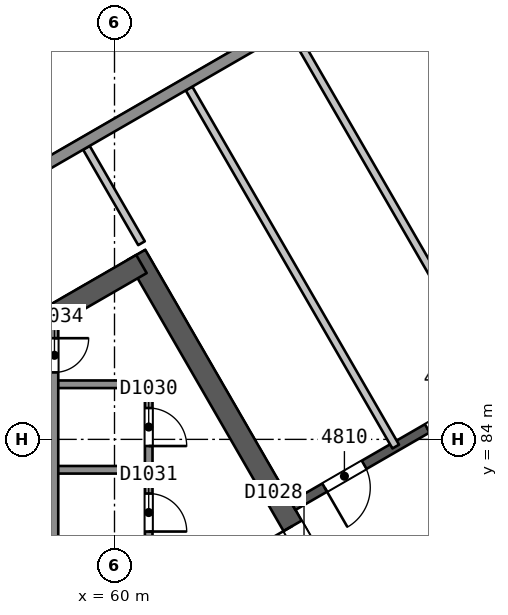
"""IFC4 building model, lengths in metres.
Left out: names, types, materials, properties, quantities, classifications, styles, units other than length and angle.
Written with IfcOpenShell. Run it as: python <this file> out.ifc"""

import sys

from ifc_helpers import new_model, si_unit, direction, frame, frame_2d, origin, place, context, subcontext, project, spatial, rectangle, extrude, element, fill, save


model = new_model("IFC4")
c1 = context("Model", 3, precision=1e-05, world=origin(), true_north=direction((0.0, 1.0)))
c2 = subcontext(c1, "Body", "Model", "MODEL_VIEW")
j1 = project(units=[si_unit("LENGTHUNIT", "METRE"), si_unit("PLANEANGLEUNIT", "RADIAN")], contexts=[c1])
p1 = place(None, origin())
s1 = spatial("IfcSite", under=j1, at=p1, CompositionType="ELEMENT")
p2 = place(p1, origin())
s2 = spatial("IfcBuilding", under=s1, at=p2, CompositionType="ELEMENT")
p3 = place(p2, frame((0.0, 0.0, 197.0)))
s3 = spatial("IfcBuildingStorey", under=s2, at=p3, CompositionType="ELEMENT", Elevation=197.0)
p4 = place(p3, frame((65.682, 80.0, 0.0), z_axis=(0.0, 0.0, 1.0), x_axis=(-0.500000202252, 0.866025287014, 0.0)))
e1 = element("IfcWall", 1, at=p4, inside=s3, PredefinedType="SHEAR", context=c2, shape_type="SweptSolid", body=[
    extrude(rectangle(XDim=10.221, YDim=0.55, at=frame_2d((5.111, 0.0))), origin(), (0.0, 0.0, 1.0), 4.4),
])
p5 = place(p4, frame((0.791, 0.0, 0.0)))
e2 = element("IfcOpeningElement", 2, at=p5, cuts=e1, PredefinedType="OPENING", context=c2, shape_type="SweptSolid", body=[
    extrude(rectangle(XDim=1.2, YDim=2.1, at=frame_2d((0.6, 1.05))), frame((0.0, 0.286, 0.0), z_axis=(0.0, -1.0, 0.0), x_axis=(1.0, 0.0, 0.0)), (0.0, 0.0, 1.0), 0.571),
])
p6 = place(p3, frame((60.709, 88.614, 0.0), z_axis=(0.0, 0.0, 1.0), x_axis=(-0.866020164116, -0.500009075263, 0.0)))
e3 = element("IfcWall", 3, at=p6, inside=s3, PredefinedType="SHEAR", context=c2, shape_type="SweptSolid", body=[
    extrude(rectangle(XDim=14.058, YDim=0.55, at=frame_2d((7.029, 0.0))), origin(), (0.0, 0.0, 1.0), 4.4),
])
p7 = place(p6, frame((6.475, 0.0, 0.0)))
e4 = element("IfcOpeningElement", 4, at=p7, cuts=e3, PredefinedType="OPENING", context=c2, shape_type="SweptSolid", body=[
    extrude(rectangle(XDim=1.1, YDim=2.1, at=frame_2d((0.55, 1.05))), frame((0.0, 0.286, 0.0), z_axis=(0.0, -1.0, 0.0), x_axis=(1.0, 0.0, 0.0)), (0.0, 0.0, 1.0), 0.571),
])
p8 = place(p3, frame((78.2, 90.046, 0.0), z_axis=(0.0, 0.0, 1.0), x_axis=(-0.866026492143, -0.499998114903, 0.0)))
e5 = element("IfcWall", 5, at=p8, inside=s3, PredefinedType="SHEAR", context=c2, shape_type="SweptSolid", body=[
    extrude(rectangle(XDim=15.588, YDim=0.25, at=frame_2d((7.794, 0.0))), origin(), (0.0, 0.0, 1.0), 3.95),
])
p9 = place(p8, frame((2.518, 0.0, 0.0)))
e6 = element("IfcOpeningElement", 6, at=p9, cuts=e5, PredefinedType="OPENING", context=c2, shape_type="SweptSolid", body=[
    extrude(rectangle(XDim=1.2, YDim=2.4, at=frame_2d((0.6, 1.2))), frame((0.0, 0.135, 0.0), z_axis=(0.0, -1.0, 0.0), x_axis=(1.0, 0.0, 0.0)), (0.0, 0.0, 1.0), 0.271),
])
p10 = place(p8, frame((7.194, 0.0, 0.0)))
e7 = element("IfcOpeningElement", 7, at=p10, cuts=e5, PredefinedType="OPENING", context=c2, shape_type="SweptSolid", body=[
    extrude(rectangle(XDim=1.2, YDim=2.4, at=frame_2d((0.6, 1.2))), frame((0.0, 0.135, 0.0), z_axis=(0.0, -1.0, 0.0), x_axis=(1.0, 0.0, 0.0)), (0.0, 0.0, 1.0), 0.271),
])
p11 = place(p8, frame((10.312, 0.0, 0.0)))
e8 = element("IfcOpeningElement", 8, at=p11, cuts=e5, PredefinedType="OPENING", context=c2, shape_type="SweptSolid", body=[
    extrude(rectangle(XDim=1.2, YDim=2.4, at=frame_2d((0.6, 1.2))), frame((0.0, 0.135, 0.0), z_axis=(0.0, -1.0, 0.0), x_axis=(1.0, 0.0, 0.0)), (0.0, 0.0, 1.0), 0.271),
])
p12 = place(p8, frame((13.43, 0.0, 0.0)))
e9 = element("IfcOpeningElement", 9, at=p12, cuts=e5, PredefinedType="OPENING", context=c2, shape_type="SweptSolid", body=[
    extrude(rectangle(XDim=1.2, YDim=2.4, at=frame_2d((0.6, 1.2))), frame((0.0, 0.135, 0.0), z_axis=(0.0, -1.0, 0.0), x_axis=(1.0, 0.0, 0.0)), (0.0, 0.0, 1.0), 0.271),
])
p13 = place(p3, frame((67.36, 96.35, 0.0), z_axis=(0.0, 0.0, 1.0), x_axis=(0.49999829022, -0.866026390924, 0.0)))
e10 = element("IfcWall", 10, at=p13, inside=s3, PredefinedType="PARTITIONING", context=c2, shape_type="SweptSolid", body=[
    extrude(rectangle(XDim=10.879, YDim=0.2, at=frame_2d((5.44, 0.0))), origin(), (0.0, 0.0, 1.0), 3.95),
])
p14 = place(p3, frame((64.66, 94.791, 0.0), z_axis=(0.0, 0.0, 1.0), x_axis=(0.500015120401, -0.866016673841, 0.0)))
e11 = element("IfcWall", 11, at=p14, inside=s3, PredefinedType="PARTITIONING", context=c2, shape_type="SweptSolid", body=[
    extrude(rectangle(XDim=10.88, YDim=0.2, at=frame_2d((5.44, 0.0))), origin(), (0.0, 0.0, 1.0), 3.95),
])
p15 = place(p3, frame((61.96, 93.232, 0.0), z_axis=(0.0, 0.0, 1.0), x_axis=(0.49999829022, -0.866026390924, 0.0)))
e12 = element("IfcWall", 12, at=p15, inside=s3, PredefinedType="PARTITIONING", context=c2, shape_type="SweptSolid", body=[
    extrude(rectangle(XDim=10.879, YDim=0.2, at=frame_2d((5.44, 0.0))), origin(), (0.0, 0.0, 1.0), 3.95),
])
p16 = place(p3, frame((60.71, 89.162, 0.0), z_axis=(0.0, 0.0, 1.0), x_axis=(-0.499977468037, 0.866038412228, 0.0)))
e13 = element("IfcWall", 13, at=p16, inside=s3, PredefinedType="PARTITIONING", context=c2, shape_type="SweptSolid", body=[
    extrude(rectangle(XDim=2.901, YDim=0.2, at=frame_2d((1.45, 0.0))), origin(), (0.0, 0.0, 1.0), 3.95),
])
p17 = place(p3, frame((43.362, 82.667, 0.0), z_axis=(0.0, 0.0, 1.0), x_axis=(0.866025243948, 0.500000276845, 0.0)))
e14 = element("IfcWall", 14, at=p17, inside=s3, PredefinedType="SOLIDWALL", context=c2, shape_type="SweptSolid", body=[
    extrude(rectangle(XDim=52.132, YDim=0.3, at=frame_2d((26.066, 0.0))), origin(), (0.0, 0.0, 1.0), 3.95),
])
p18 = place(p17, frame((8.193, 0.0, 0.9)))
e15 = element("IfcOpeningElement", 15, at=p18, cuts=e14, PredefinedType="OPENING", context=c2, shape_type="SweptSolid", body=[
    extrude(rectangle(XDim=1.8, YDim=1.5, at=frame_2d((0.9, 0.75))), frame((0.0, 0.161, 0.0), z_axis=(0.0, -1.0, 0.0), x_axis=(1.0, 0.0, 0.0)), (0.0, 0.0, 1.0), 0.321),
])
p19 = place(p17, frame((42.139, 0.0, 0.9)))
e16 = element("IfcOpeningElement", 16, at=p19, cuts=e14, PredefinedType="OPENING", context=c2, shape_type="SweptSolid", body=[
    extrude(rectangle(XDim=1.8, YDim=1.5, at=frame_2d((0.9, 0.75))), frame((0.0, 0.161, 0.0), z_axis=(0.0, -1.0, 0.0), x_axis=(1.0, 0.0, 0.0)), (0.0, 0.0, 1.0), 0.321),
])
p20 = place(p17, frame((3.713, 0.0, 0.6)))
e17 = element("IfcOpeningElement", 17, at=p20, cuts=e14, PredefinedType="OPENING", context=c2, shape_type="SweptSolid", body=[
    extrude(rectangle(XDim=3.0, YDim=2.4, at=frame_2d((1.5, 1.2))), frame((0.0, 0.161, 0.0), z_axis=(0.0, -1.0, 0.0), x_axis=(1.0, 0.0, 0.0)), (0.0, 0.0, 1.0), 0.321),
])
p21 = place(p17, frame((14.14, 0.0, 0.6)))
e18 = element("IfcOpeningElement", 18, at=p21, cuts=e14, PredefinedType="OPENING", context=c2, shape_type="SweptSolid", body=[
    extrude(rectangle(XDim=3.0, YDim=2.4, at=frame_2d((1.5, 1.2))), frame((0.0, 0.161, 0.0), z_axis=(0.0, -1.0, 0.0), x_axis=(1.0, 0.0, 0.0)), (0.0, 0.0, 1.0), 0.321),
])
p22 = place(p17, frame((24.566, 0.0, 0.6)))
e19 = element("IfcOpeningElement", 19, at=p22, cuts=e14, PredefinedType="OPENING", context=c2, shape_type="SweptSolid", body=[
    extrude(rectangle(XDim=3.0, YDim=2.4, at=frame_2d((1.5, 1.2))), frame((0.0, 0.161, 0.0), z_axis=(0.0, -1.0, 0.0), x_axis=(1.0, 0.0, 0.0)), (0.0, 0.0, 1.0), 0.321),
])
p23 = place(p17, frame((34.992, 0.0, 0.6)))
e20 = element("IfcOpeningElement", 20, at=p23, cuts=e14, PredefinedType="OPENING", context=c2, shape_type="SweptSolid", body=[
    extrude(rectangle(XDim=3.0, YDim=2.4, at=frame_2d((1.5, 1.2))), frame((0.0, 0.161, 0.0), z_axis=(0.0, -1.0, 0.0), x_axis=(1.0, 0.0, 0.0)), (0.0, 0.0, 1.0), 0.321),
])
p24 = place(p17, frame((45.419, 0.0, 0.6)))
e21 = element("IfcOpeningElement", 21, at=p24, cuts=e14, PredefinedType="OPENING", context=c2, shape_type="SweptSolid", body=[
    extrude(rectangle(XDim=3.0, YDim=2.4, at=frame_2d((1.5, 1.2))), frame((0.0, 0.161, 0.0), z_axis=(0.0, -1.0, 0.0), x_axis=(1.0, 0.0, 0.0)), (0.0, 0.0, 1.0), 0.321),
])
for number, where, z_axis, x_axis in (
    (22, (60.9, 85.45, 0.0), (0.0, 0.0, 1.0), (-1.0, 0.0, 0.0)),
    (23, (60.9, 83.2, 0.0), (0.0, 0.0, 1.0), (-1.0, 0.0, 0.0)),
):
    element("IfcWall", number, at=place(p3, frame(where, z_axis=z_axis, x_axis=x_axis)), inside=s3, PredefinedType="SOLIDWALL", context=c2, shape_type="SweptSolid", body=[
        extrude(rectangle(XDim=2.48, YDim=0.2, at=frame_2d((1.24, 0.0))), origin(), (0.0, 0.0, 1.0), 3.95),
    ])
p25 = place(p3, frame((58.42, 82.075, 0.0), z_axis=(0.0, 0.0, 1.0), x_axis=(-1.0, 0.0, 0.0)))
e24 = element("IfcWall", 24, at=p25, inside=s3, PredefinedType="SOLIDWALL", context=c2, shape_type="SweptSolid", body=[
    extrude(rectangle(XDim=7.7, YDim=0.2, at=frame_2d((3.85, 0.0))), origin(), (0.0, 0.0, 1.0), 3.95),
])
p26 = place(p25, frame((0.55, 0.0, 0.0)))
e25 = element("IfcOpeningElement", 25, at=p26, cuts=e24, PredefinedType="OPENING", context=c2, shape_type="SweptSolid", body=[
    extrude(rectangle(XDim=1.1, YDim=2.1, at=frame_2d((0.55, 1.05))), frame((0.0, 0.11, 0.0), z_axis=(0.0, -1.0, 0.0), x_axis=(1.0, 0.0, 0.0)), (0.0, 0.0, 1.0), 0.221),
])
p27 = place(p3, frame((60.9, 85.45, 0.0), z_axis=(0.0, 0.0, 1.0), x_axis=(0.0, -1.0, 0.0)))
e26 = element("IfcWall", 26, at=p27, inside=s3, PredefinedType="SOLIDWALL", context=c2, shape_type="SweptSolid", body=[
    extrude(rectangle(XDim=10.9, YDim=0.2, at=frame_2d((5.45, 0.0))), origin(), (0.0, 0.0, 1.0), 3.95),
])
p28 = place(p27, frame((0.625, 0.0, 0.0)))
e27 = element("IfcOpeningElement", 27, at=p28, cuts=e26, PredefinedType="OPENING", context=c2, shape_type="SweptSolid", body=[
    extrude(rectangle(XDim=1.0, YDim=2.1, at=frame_2d((0.5, 1.05))), frame((0.0, 0.11, 0.0), z_axis=(0.0, -1.0, 0.0), x_axis=(1.0, 0.0, 0.0)), (0.0, 0.0, 1.0), 0.221),
])
p29 = place(p27, frame((2.875, 0.0, 0.0)))
e28 = element("IfcOpeningElement", 28, at=p29, cuts=e26, PredefinedType="OPENING", context=c2, shape_type="SweptSolid", body=[
    extrude(rectangle(XDim=1.0, YDim=2.1, at=frame_2d((0.5, 1.05))), frame((0.0, 0.11, 0.0), z_axis=(0.0, -1.0, 0.0), x_axis=(1.0, 0.0, 0.0)), (0.0, 0.0, 1.0), 0.221),
])
p30 = place(p27, frame((6.25, 0.0, 0.0)))
e29 = element("IfcOpeningElement", 29, at=p30, cuts=e26, PredefinedType="OPENING", context=c2, shape_type="SweptSolid", body=[
    extrude(rectangle(XDim=1.0, YDim=2.1, at=frame_2d((0.5, 1.05))), frame((0.0, 0.11, 0.0), z_axis=(0.0, -1.0, 0.0), x_axis=(1.0, 0.0, 0.0)), (0.0, 0.0, 1.0), 0.221),
])
p31 = place(p3, frame((58.42, 86.974, 0.0), z_axis=(0.0, 0.0, 1.0), x_axis=(0.0, -1.0, 0.0)))
e30 = element("IfcWall", 30, at=p31, inside=s3, PredefinedType="SOLIDWALL", context=c2, shape_type="SweptSolid", body=[
    extrude(rectangle(XDim=10.524, YDim=0.2, at=frame_2d((5.262, 0.0))), origin(), (0.0, 0.0, 1.0), 3.95),
])
p32 = place(p31, frame((0.312, 0.0, 0.0)))
e31 = element("IfcOpeningElement", 31, at=p32, cuts=e30, PredefinedType="OPENING", context=c2, shape_type="SweptSolid", body=[
    extrude(rectangle(XDim=0.9, YDim=2.1, at=frame_2d((0.45, 1.05))), frame((0.0, 0.11, 0.0), z_axis=(0.0, -1.0, 0.0), x_axis=(1.0, 0.0, 0.0)), (0.0, 0.0, 1.0), 0.221),
])
p33 = place(p3, frame((77.738, 86.846, 0.0), z_axis=(0.0, 0.0, 1.0), x_axis=(-0.866026658274, -0.499997827154, 0.0)))
e32 = element("IfcWall", 32, at=p33, inside=s3, PredefinedType="PARTITIONING", context=c2, shape_type="SweptSolid", body=[
    extrude(rectangle(XDim=11.588, YDim=0.1, at=frame_2d((5.794, 0.0))), origin(), (0.0, 0.0, 1.0), 3.95),
])
p34 = place(p11, origin())
e33 = element("IfcDoor", 33, at=p34, inside=s3, OperationType="SINGLE_SWING_RIGHT", PredefinedType="NOTDEFINED", context=c2, shape_type="SweptSolid", body=[
    extrude(rectangle(XDim=1.2, YDim=2.4, at=frame_2d((0.6, 1.2))), frame((0.0, 0.025, 0.0), z_axis=(0.0, -1.0, 0.0), x_axis=(1.0, 0.0, 0.0)), (0.0, 0.0, 1.0), 0.05),
])
fill(e8, e33)
p35 = place(p12, origin())
e34 = element("IfcDoor", 34, at=p35, inside=s3, OperationType="SINGLE_SWING_RIGHT", PredefinedType="NOTDEFINED", context=c2, shape_type="SweptSolid", body=[
    extrude(rectangle(XDim=1.2, YDim=2.4, at=frame_2d((0.6, 1.2))), frame((0.0, 0.025, 0.0), z_axis=(0.0, -1.0, 0.0), x_axis=(1.0, 0.0, 0.0)), (0.0, 0.0, 1.0), 0.05),
])
fill(e9, e34)
p36 = place(p5, origin())
e35 = element("IfcDoor", 35, at=p36, inside=s3, OperationType="SINGLE_SWING_RIGHT", PredefinedType="NOTDEFINED", context=c2, shape_type="SweptSolid", body=[
    extrude(rectangle(XDim=1.2, YDim=2.1, at=frame_2d((0.6, 1.05))), frame((0.0, 0.025, 0.0), z_axis=(0.0, -1.0, 0.0), x_axis=(1.0, 0.0, 0.0)), (0.0, 0.0, 1.0), 0.05),
])
fill(e2, e35)
p37 = place(p28, origin())
e36 = element("IfcDoor", 36, at=p37, inside=s3, OperationType="SINGLE_SWING_RIGHT", PredefinedType="NOTDEFINED", context=c2, shape_type="SweptSolid", body=[
    extrude(rectangle(XDim=1.0, YDim=2.1, at=frame_2d((0.5, 1.05))), frame((0.0, 0.025, 0.0), z_axis=(0.0, -1.0, 0.0), x_axis=(1.0, 0.0, 0.0)), (0.0, 0.0, 1.0), 0.05),
])
fill(e27, e36)
p38 = place(p29, origin())
e37 = element("IfcDoor", 37, at=p38, inside=s3, OperationType="SINGLE_SWING_RIGHT", PredefinedType="NOTDEFINED", context=c2, shape_type="SweptSolid", body=[
    extrude(rectangle(XDim=1.0, YDim=2.1, at=frame_2d((0.5, 1.05))), frame((0.0, 0.025, 0.0), z_axis=(0.0, -1.0, 0.0), x_axis=(1.0, 0.0, 0.0)), (0.0, 0.0, 1.0), 0.05),
])
fill(e28, e37)
p39 = place(p32, origin())
e38 = element("IfcDoor", 38, at=p39, inside=s3, OperationType="SINGLE_SWING_LEFT", PredefinedType="NOTDEFINED", context=c2, shape_type="SweptSolid", body=[
    extrude(rectangle(XDim=0.9, YDim=2.1, at=frame_2d((0.45, 1.05))), frame((0.0, 0.025, 0.0), z_axis=(0.0, -1.0, 0.0), x_axis=(1.0, 0.0, 0.0)), (0.0, 0.0, 1.0), 0.05),
])
fill(e31, e38)
save(model, sys.argv[1])
